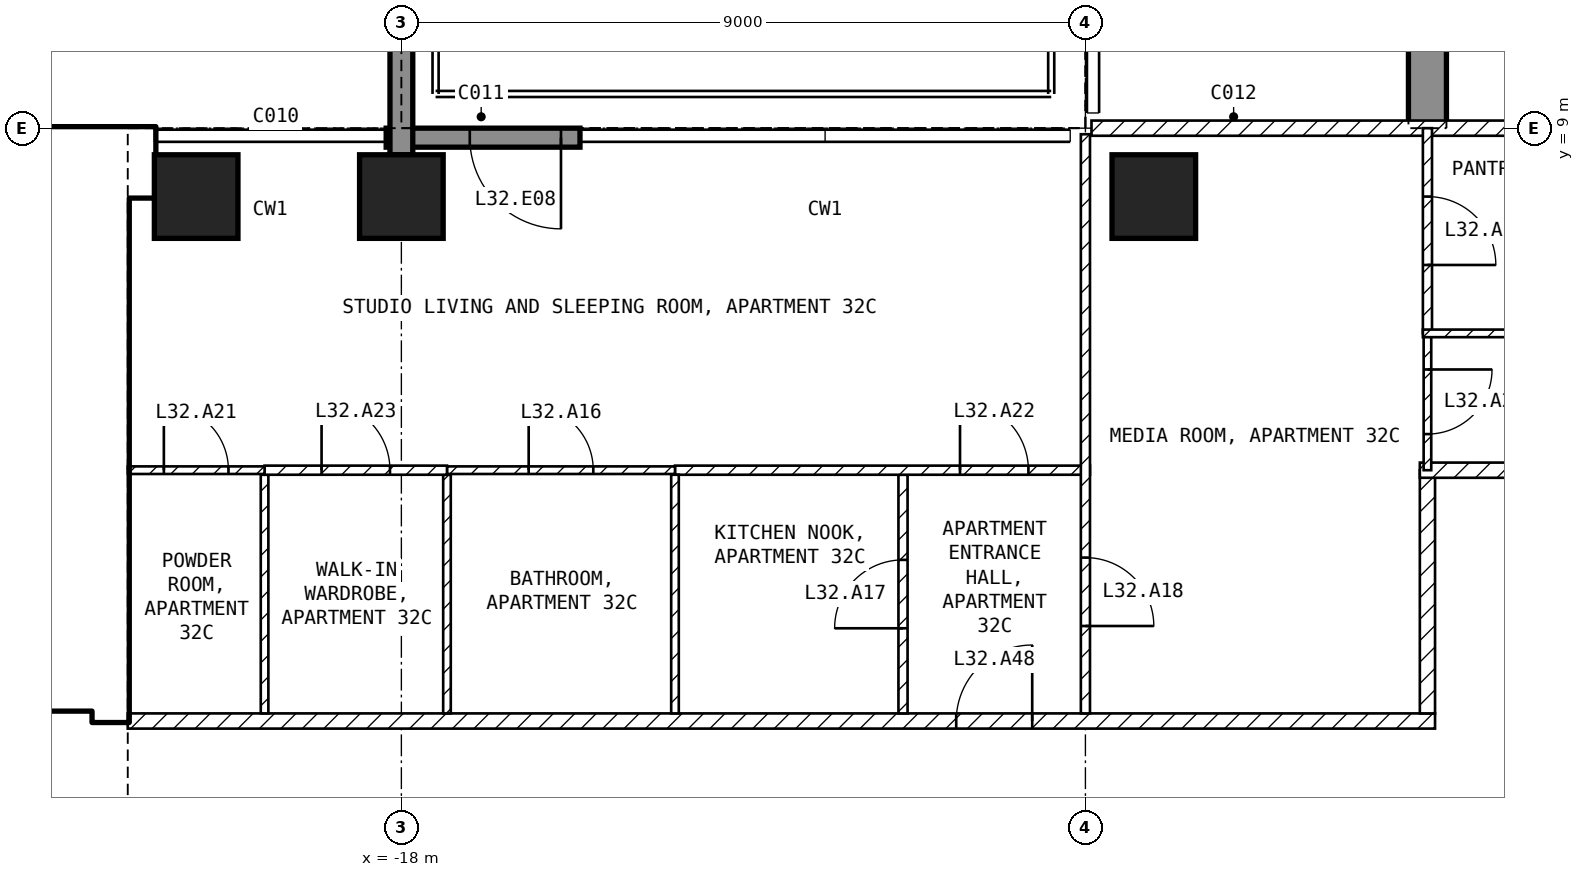
"""IFC4 building model, lengths in metres.
Left out: names, types, materials, properties, quantities, classifications, styles, units other than length and angle.
Written with IfcOpenShell. Run it as: python <this file> out.ifc"""

import sys

from ifc_helpers import new_model, si_unit, direction, frame, frame_2d, origin, origin_2d, place, context, subcontext, project, spatial, polyline, rectangle, outline, extrude, element, fill, save


model = new_model("IFC4")
c1 = context("Model", 3, precision=1e-05, world=origin(), true_north=direction((0.0, 1.0)))
c2 = subcontext(c1, "Body", "Model", "MODEL_VIEW")
j1 = project(units=[si_unit("LENGTHUNIT", "METRE"), si_unit("PLANEANGLEUNIT", "RADIAN")], contexts=[c1])
p1 = place(None, origin())
s1 = spatial("IfcSite", under=j1, at=p1, CompositionType="ELEMENT")
p2 = place(p1, origin())
s2 = spatial("IfcBuilding", under=s1, at=p2, CompositionType="ELEMENT")
p3 = place(p2, frame((0.0, 0.0, 133.9)))
s3 = spatial("IfcBuildingStorey", under=s2, at=p3, CompositionType="ELEMENT", Elevation=133.9)
for number, where, z_axis, x_axis in (
    (1, (-20.7, 8.1, -0.25), (0.0, 0.0, 1.0), (1.0, 0.0, 0.0)),
    (2, (-18.0, 8.1, -0.25), (0.0, 0.0, 1.0), (1.0, 0.0, 0.0)),
    (3, (-8.1, 8.1, -0.25), (0.0, 0.0, 1.0), (1.0, 0.0, 0.0)),
):
    element("IfcColumn", number, at=place(p3, frame(where, z_axis=z_axis, x_axis=x_axis)), inside=s3, PredefinedType="COLUMN", context=c2, shape_type="SweptSolid", body=[
        extrude(rectangle(XDim=1.1, YDim=1.1, at=origin_2d()), origin(), (0.0, 0.0, 1.0), 3.5),
    ])
p4 = place(p3, frame((-4.75, 9.0, -0.25), z_axis=(1.0, 0.0, 0.0), x_axis=(0.0, 1.0, 0.0)))
e4 = element("IfcWall", 4, at=p4, inside=s3, PredefinedType="SHEAR", context=c2, shape_type="SweptSolid", body=[
    extrude(outline(polyline([(0.0, 0.0), (2.1, 0.0), (2.1, 2.65), (4.5, 2.65), (4.5, 0.0), (9.9, 0.0), (9.9, 2.65), (12.3, 2.65), (12.3, 0.0), (16.55, 0.0), (16.55, 3.5), (0.0, 3.5), (0.0, 0.0)])), origin(), (0.0, 0.0, 1.0), 0.5),
])
p5 = place(p3, frame((-15.65, 8.875, 0.0), z_axis=(0.0, 0.0, 1.0), x_axis=(-1.0, 0.0, 0.0)))
e5 = element("IfcWall", 5, at=p5, inside=s3, PredefinedType="SOLIDWALL", context=c2, shape_type="SweptSolid", body=[
    extrude(rectangle(XDim=2.55, YDim=0.25, at=frame_2d((1.275, 0.0))), origin(), (0.0, 0.0, 1.0), 3.25),
])
p6 = place(p5, frame((0.25, 0.0, 0.0)))
e6 = element("IfcOpeningElement", 6, at=p6, cuts=e5, PredefinedType="OPENING", context=c2, shape_type="SweptSolid", body=[
    extrude(rectangle(XDim=1.2, YDim=2.4, at=frame_2d((0.6, 1.2))), frame((0.0, 0.135, 0.0), z_axis=(0.0, -1.0, 0.0), x_axis=(1.0, 0.0, 0.0)), (0.0, 0.0, 1.0), 0.27),
])
p7 = place(p3, frame((-18.0, 8.65, 0.0), z_axis=(0.0, 0.0, 1.0), x_axis=(0.0, 1.0, 0.0)))
e7 = element("IfcWall", 7, at=p7, inside=s3, PredefinedType="SOLIDWALL", context=c2, shape_type="SweptSolid", body=[
    extrude(rectangle(XDim=3.09, YDim=0.3, at=frame_2d((1.545, 0.0))), origin(), (0.0, 0.0, 1.0), 3.25),
])
p8 = place(p3, frame((-29.45, 8.55, 0.0), z_axis=(0.0, 0.0, 1.0), x_axis=(1.0, 0.0, 0.0)))
e8 = element("IfcWall", 8, at=p8, inside=s3, PredefinedType="SHEAR", context=c2, shape_type="SweptSolid", body=[
    extrude(rectangle(XDim=8.2, YDim=0.9, at=frame_2d((4.1, 0.0))), origin(), (0.0, 0.0, 1.0), 3.25),
])
p9 = place(p3, frame((-21.825, 1.2, 0.0), z_axis=(0.0, 0.0, 1.0), x_axis=(0.0, 1.0, 0.0)))
e9 = element("IfcWall", 9, at=p9, inside=s3, PredefinedType="SHEAR", context=c2, shape_type="SweptSolid", body=[
    extrude(rectangle(XDim=6.9, YDim=0.45, at=frame_2d((3.45, 0.0))), origin(), (0.0, 0.0, 1.0), 3.25),
])
p10 = place(p3, frame((-33.05, 1.45, 0.0), z_axis=(0.0, 0.0, 1.0), x_axis=(1.0, 0.0, 0.0)))
e10 = element("IfcWall", 10, at=p10, inside=s3, PredefinedType="SOLIDWALL", context=c2, shape_type="SweptSolid", body=[
    extrude(rectangle(XDim=11.0, YDim=0.2, at=frame_2d((5.5, 0.0))), origin(), (0.0, 0.0, 1.0), 3.25),
])
p11 = place(p10, frame((9.25, 0.0, 0.0)))
e11 = element("IfcOpeningElement", 11, at=p11, cuts=e10, PredefinedType="OPENING", context=c2, shape_type="SweptSolid", body=[
    extrude(rectangle(XDim=1.0, YDim=2.1, at=frame_2d((0.5, 1.05))), frame((0.0, 0.11, 0.0), z_axis=(0.0, -1.0, 0.0), x_axis=(1.0, 0.0, 0.0)), (0.0, 0.0, 1.0), 0.22),
])
p12 = place(p10, frame((6.75, 0.0, 0.0)))
e12 = element("IfcOpeningElement", 12, at=p12, cuts=e10, PredefinedType="OPENING", context=c2, shape_type="SweptSolid", body=[
    extrude(rectangle(XDim=1.0, YDim=2.1, at=frame_2d((0.5, 1.05))), frame((0.0, 0.11, 0.0), z_axis=(0.0, -1.0, 0.0), x_axis=(1.0, 0.0, 0.0)), (0.0, 0.0, 1.0), 0.22),
])
p13 = place(p10, frame((1.025, 0.0, 0.0)))
e13 = element("IfcOpeningElement", 13, at=p13, cuts=e10, PredefinedType="OPENING", context=c2, shape_type="SweptSolid", body=[
    extrude(rectangle(XDim=0.9, YDim=2.1, at=frame_2d((0.45, 1.05))), frame((0.0, 0.11, 0.0), z_axis=(0.0, -1.0, 0.0), x_axis=(1.0, 0.0, 0.0)), (0.0, 0.0, 1.0), 0.22),
])
p14 = place(p3, frame((-28.35, 5.15, 0.0), z_axis=(0.0, 0.0, 1.0), x_axis=(1.0, 0.0, 0.0)))
e14 = element("IfcWall", 14, at=p14, inside=s3, PredefinedType="SOLIDWALL", context=c2, shape_type="SweptSolid", body=[
    extrude(rectangle(XDim=6.3, YDim=0.2, at=frame_2d((3.15, 0.0))), origin(), (0.0, 0.0, 1.0), 3.25),
])
p15 = place(p14, frame((5.1, 0.0, 0.0)))
e15 = element("IfcOpeningElement", 15, at=p15, cuts=e14, PredefinedType="OPENING", context=c2, shape_type="SweptSolid", body=[
    extrude(rectangle(XDim=1.0, YDim=2.1, at=frame_2d((0.5, 1.05))), frame((0.0, 0.11, 0.0), z_axis=(0.0, -1.0, 0.0), x_axis=(1.0, 0.0, 0.0)), (0.0, 0.0, 1.0), 0.22),
])
p16 = place(p3, frame((-21.6, 1.2, 0.0), z_axis=(0.0, 0.0, 1.0), x_axis=(1.0, 0.0, 0.0)))
e16 = element("IfcWall", 16, at=p16, inside=s3, PredefinedType="PARTITIONING", context=c2, shape_type="SweptSolid", body=[
    extrude(rectangle(XDim=17.2, YDim=0.2, at=frame_2d((8.6, 0.0))), origin(), (0.0, 0.0, 1.0), 3.25),
])
p17 = place(p16, frame((10.9, 0.0, 0.0)))
e17 = element("IfcOpeningElement", 17, at=p17, cuts=e16, PredefinedType="OPENING", context=c2, shape_type="SweptSolid", body=[
    extrude(rectangle(XDim=1.0, YDim=2.1, at=frame_2d((0.5, 1.05))), frame((0.0, 0.11, 0.0), z_axis=(0.0, -1.0, 0.0), x_axis=(1.0, 0.0, 0.0)), (0.0, 0.0, 1.0), 0.22),
])
p18 = place(p3, frame((-4.5, 1.3, 0.0), z_axis=(0.0, 0.0, 1.0), x_axis=(0.0, 1.0, 0.0)))
e18 = element("IfcWall", 18, at=p18, inside=s3, PredefinedType="PARTITIONING", context=c2, shape_type="SweptSolid", body=[
    extrude(rectangle(XDim=3.2, YDim=0.2, at=frame_2d((1.6, 0.0))), origin(), (0.0, 0.0, 1.0), 3.25),
])
p19 = place(p3, frame((-4.6, 4.5, 0.0), z_axis=(0.0, 0.0, 1.0), x_axis=(1.0, 0.0, 0.0)))
e19 = element("IfcWall", 19, at=p19, inside=s3, PredefinedType="PARTITIONING", context=c2, shape_type="SweptSolid", body=[
    extrude(rectangle(XDim=3.5, YDim=0.2, at=frame_2d((1.75, 0.0))), origin(), (0.0, 0.0, 1.0), 3.25),
])
p20 = place(p3, frame((-8.92, 9.0, 0.0), z_axis=(0.0, 0.0, 1.0), x_axis=(1.0, 0.0, 0.0)))
e20 = element("IfcWall", 20, at=p20, inside=s3, PredefinedType="PARTITIONING", context=c2, shape_type="SweptSolid", body=[
    extrude(rectangle(XDim=17.84, YDim=0.2, at=frame_2d((8.92, 0.0))), origin(), (0.0, 0.0, 1.0), 3.25),
])
p21 = place(p20, frame((8.42, 0.0, 0.0)))
e21 = element("IfcOpeningElement", 21, at=p21, cuts=e20, PredefinedType="OPENING", context=c2, shape_type="SweptSolid", body=[
    extrude(rectangle(XDim=1.0, YDim=2.1, at=frame_2d((0.5, 1.05))), frame((0.0, 0.11, 0.0), z_axis=(0.0, -1.0, 0.0), x_axis=(1.0, 0.0, 0.0)), (0.0, 0.0, 1.0), 0.22),
])
p22 = place(p3, frame((-11.4, 1.3, 0.0), z_axis=(0.0, 0.0, 1.0), x_axis=(0.0, 1.0, 0.0)))
e22 = element("IfcWall", 22, at=p22, inside=s3, PredefinedType="PARTITIONING", context=c2, shape_type="SweptSolid", body=[
    extrude(rectangle(XDim=3.14, YDim=0.12, at=frame_2d((1.57, 0.0))), origin(), (0.0, 0.0, 1.0), 3.25),
])
p23 = place(p22, frame((1.12, 0.0, 0.0)))
e23 = element("IfcOpeningElement", 23, at=p23, cuts=e22, PredefinedType="OPENING", context=c2, shape_type="SweptSolid", body=[
    extrude(rectangle(XDim=0.9, YDim=2.1, at=frame_2d((0.45, 1.05))), frame((0.0, 0.07, 0.0), z_axis=(0.0, -1.0, 0.0), x_axis=(1.0, 0.0, 0.0)), (0.0, 0.0, 1.0), 0.14),
])
p24 = place(p3, frame((-14.4, 4.5, 0.0), z_axis=(0.0, 0.0, 1.0), x_axis=(1.0, 0.0, 0.0)))
e24 = element("IfcWall", 24, at=p24, inside=s3, PredefinedType="PARTITIONING", context=c2, shape_type="SweptSolid", body=[
    extrude(rectangle(XDim=5.46, YDim=0.12, at=frame_2d((2.73, 0.0))), origin(), (0.0, 0.0, 1.0), 3.25),
])
p25 = place(p24, frame((3.75, 0.0, 0.0)))
e25 = element("IfcOpeningElement", 25, at=p25, cuts=e24, PredefinedType="OPENING", context=c2, shape_type="SweptSolid", body=[
    extrude(rectangle(XDim=0.9, YDim=2.1, at=frame_2d((0.45, 1.05))), frame((0.0, 0.07, 0.0), z_axis=(0.0, -1.0, 0.0), x_axis=(1.0, 0.0, 0.0)), (0.0, 0.0, 1.0), 0.14),
])
p26 = place(p3, frame((-9.0, 8.92, 0.0), z_axis=(0.0, 0.0, 1.0), x_axis=(0.0, -1.0, 0.0)))
e26 = element("IfcWall", 26, at=p26, inside=s3, PredefinedType="PARTITIONING", context=c2, shape_type="SweptSolid", body=[
    extrude(rectangle(XDim=7.62, YDim=0.12, at=frame_2d((3.81, 0.0))), origin(), (0.0, 0.0, 1.0), 3.25),
])
p27 = place(p26, frame((5.57, 0.0, 0.0)))
e27 = element("IfcOpeningElement", 27, at=p27, cuts=e26, PredefinedType="OPENING", context=c2, shape_type="SweptSolid", body=[
    extrude(rectangle(XDim=0.9, YDim=2.1, at=frame_2d((0.45, 1.05))), frame((0.0, 0.07, 0.0), z_axis=(0.0, -1.0, 0.0), x_axis=(1.0, 0.0, 0.0)), (0.0, 0.0, 1.0), 0.14),
])
for number, where, z_axis, x_axis in (
    (28, (-14.4, 1.3, 0.0), (0.0, 0.0, 1.0), (0.0, 1.0, 0.0)),
    (29, (-17.4, 1.3, 0.0), (0.0, 0.0, 1.0), (0.0, 1.0, 0.0)),
):
    element("IfcWall", number, at=place(p3, frame(where, z_axis=z_axis, x_axis=x_axis)), inside=s3, PredefinedType="PARTITIONING", context=c2, shape_type="SweptSolid", body=[
        extrude(rectangle(XDim=3.14, YDim=0.1, at=frame_2d((1.57, 0.0))), origin(), (0.0, 0.0, 1.0), 3.25),
    ])
p28 = place(p3, frame((-17.4, 4.5, 0.0), z_axis=(0.0, 0.0, 1.0), x_axis=(1.0, 0.0, 0.0)))
e30 = element("IfcWall", 30, at=p28, inside=s3, PredefinedType="PARTITIONING", context=c2, shape_type="SweptSolid", body=[
    extrude(rectangle(XDim=3.0, YDim=0.1, at=frame_2d((1.5, 0.0))), origin(), (0.0, 0.0, 1.0), 3.25),
])
p29 = place(p28, frame((1.075, 0.0, 0.0)))
e31 = element("IfcOpeningElement", 31, at=p29, cuts=e30, PredefinedType="OPENING", context=c2, shape_type="SweptSolid", body=[
    extrude(rectangle(XDim=0.85, YDim=2.1, at=frame_2d((0.425, 1.05))), frame((0.0, 0.06, 0.0), z_axis=(0.0, -1.0, 0.0), x_axis=(1.0, 0.0, 0.0)), (0.0, 0.0, 1.0), 0.12),
])
p30 = place(p3, frame((-19.8, 1.3, 0.0), z_axis=(0.0, 0.0, 1.0), x_axis=(0.0, 1.0, 0.0)))
e32 = element("IfcWall", 32, at=p30, inside=s3, PredefinedType="PARTITIONING", context=c2, shape_type="SweptSolid", body=[
    extrude(rectangle(XDim=3.14, YDim=0.1, at=frame_2d((1.57, 0.0))), origin(), (0.0, 0.0, 1.0), 3.25),
])
p31 = place(p3, frame((-19.8, 4.5, 0.0), z_axis=(0.0, 0.0, 1.0), x_axis=(1.0, 0.0, 0.0)))
e33 = element("IfcWall", 33, at=p31, inside=s3, PredefinedType="PARTITIONING", context=c2, shape_type="SweptSolid", body=[
    extrude(rectangle(XDim=2.4, YDim=0.12, at=frame_2d((1.2, 0.0))), origin(), (0.0, 0.0, 1.0), 3.25),
])
p32 = place(p31, frame((0.75, 0.0, 0.0)))
e34 = element("IfcOpeningElement", 34, at=p32, cuts=e33, PredefinedType="OPENING", context=c2, shape_type="SweptSolid", body=[
    extrude(rectangle(XDim=0.9, YDim=2.1, at=frame_2d((0.45, 1.05))), frame((0.0, 0.07, 0.0), z_axis=(0.0, -1.0, 0.0), x_axis=(1.0, 0.0, 0.0)), (0.0, 0.0, 1.0), 0.14),
])
p33 = place(p3, frame((-21.6, 4.5, 0.0), z_axis=(0.0, 0.0, 1.0), x_axis=(1.0, 0.0, 0.0)))
e35 = element("IfcWall", 35, at=p33, inside=s3, PredefinedType="PARTITIONING", context=c2, shape_type="SweptSolid", body=[
    extrude(rectangle(XDim=1.8, YDim=0.1, at=frame_2d((0.9, 0.0))), origin(), (0.0, 0.0, 1.0), 3.25),
])
p34 = place(p33, frame((0.475, 0.0, 0.0)))
e36 = element("IfcOpeningElement", 36, at=p34, cuts=e35, PredefinedType="OPENING", context=c2, shape_type="SweptSolid", body=[
    extrude(rectangle(XDim=0.85, YDim=2.1, at=frame_2d((0.425, 1.05))), frame((0.0, 0.06, 0.0), z_axis=(0.0, -1.0, 0.0), x_axis=(1.0, 0.0, 0.0)), (0.0, 0.0, 1.0), 0.12),
])
p35 = place(p3, frame((-4.5, 6.3, 0.0), z_axis=(0.0, 0.0, 1.0), x_axis=(0.0, -1.0, 0.0)))
e37 = element("IfcWall", 37, at=p35, inside=s3, PredefinedType="PARTITIONING", context=c2, shape_type="SweptSolid", body=[
    extrude(rectangle(XDim=1.8, YDim=0.1, at=frame_2d((0.9, 0.0))), origin(), (0.0, 0.0, 1.0), 3.25),
])
p36 = place(p35, frame((0.475, 0.0, 0.0)))
e38 = element("IfcOpeningElement", 38, at=p36, cuts=e37, PredefinedType="OPENING", context=c2, shape_type="SweptSolid", body=[
    extrude(rectangle(XDim=0.85, YDim=2.1, at=frame_2d((0.425, 1.05))), frame((0.0, 0.06, 0.0), z_axis=(0.0, -1.0, 0.0), x_axis=(1.0, 0.0, 0.0)), (0.0, 0.0, 1.0), 0.12),
])
p37 = place(p3, frame((-4.5, 9.0, 0.0), z_axis=(0.0, 0.0, 1.0), x_axis=(0.0, -1.0, 0.0)))
e39 = element("IfcWall", 39, at=p37, inside=s3, PredefinedType="PARTITIONING", context=c2, shape_type="SweptSolid", body=[
    extrude(rectangle(XDim=2.7, YDim=0.12, at=frame_2d((1.35, 0.0))), origin(), (0.0, 0.0, 1.0), 3.25),
])
p38 = place(p37, frame((0.9, 0.0, 0.0)))
e40 = element("IfcOpeningElement", 40, at=p38, cuts=e39, PredefinedType="OPENING", context=c2, shape_type="SweptSolid", body=[
    extrude(rectangle(XDim=0.9, YDim=2.1, at=frame_2d((0.45, 1.05))), frame((0.0, 0.07, 0.0), z_axis=(0.0, -1.0, 0.0), x_axis=(1.0, 0.0, 0.0)), (0.0, 0.0, 1.0), 0.14),
])
p39 = place(p3, frame((-4.56, 6.3, 0.0), z_axis=(0.0, 0.0, 1.0), x_axis=(1.0, 0.0, 0.0)))
e41 = element("IfcWall", 41, at=p39, inside=s3, PredefinedType="PARTITIONING", context=c2, shape_type="SweptSolid", body=[
    extrude(rectangle(XDim=3.46, YDim=0.1, at=frame_2d((1.73, 0.0))), origin(), (0.0, 0.0, 1.0), 3.25),
])
p40 = place(p6, origin())
e42 = element("IfcDoor", 42, at=p40, inside=s3, OperationType="SINGLE_SWING_LEFT", PredefinedType="DOOR", context=c2, shape_type="SweptSolid", body=[
    extrude(rectangle(XDim=1.2, YDim=2.4, at=frame_2d((0.6, 1.2))), frame((0.0, 0.025, 0.0), z_axis=(0.0, -1.0, 0.0), x_axis=(1.0, 0.0, 0.0)), (0.0, 0.0, 1.0), 0.05),
])
fill(e6, e42)
p41 = place(p15, origin())
e43 = element("IfcDoor", 43, at=p41, inside=s3, OperationType="SINGLE_SWING_LEFT", PredefinedType="DOOR", context=c2, shape_type="SweptSolid", body=[
    extrude(rectangle(XDim=1.0, YDim=2.1, at=frame_2d((0.5, 1.05))), frame((0.0, 0.025, 0.0), z_axis=(0.0, -1.0, 0.0), x_axis=(1.0, 0.0, 0.0)), (0.0, 0.0, 1.0), 0.05),
])
fill(e15, e43)
p42 = place(p29, origin())
e44 = element("IfcDoor", 44, at=p42, inside=s3, OperationType="SINGLE_SWING_LEFT", PredefinedType="DOOR", context=c2, shape_type="SweptSolid", body=[
    extrude(rectangle(XDim=0.85, YDim=2.1, at=frame_2d((0.425, 1.05))), frame((0.0, 0.025, 0.0), z_axis=(0.0, -1.0, 0.0), x_axis=(1.0, 0.0, 0.0)), (0.0, 0.0, 1.0), 0.05),
])
fill(e31, e44)
p43 = place(p23, origin())
e45 = element("IfcDoor", 45, at=p43, inside=s3, OperationType="SINGLE_SWING_LEFT", PredefinedType="DOOR", context=c2, shape_type="SweptSolid", body=[
    extrude(rectangle(XDim=0.9, YDim=2.1, at=frame_2d((0.45, 1.05))), frame((0.0, 0.025, 0.0), z_axis=(0.0, -1.0, 0.0), x_axis=(1.0, 0.0, 0.0)), (0.0, 0.0, 1.0), 0.05),
])
fill(e23, e45)
p44 = place(p27, origin())
e46 = element("IfcDoor", 46, at=p44, inside=s3, OperationType="SINGLE_SWING_RIGHT", PredefinedType="DOOR", context=c2, shape_type="SweptSolid", body=[
    extrude(rectangle(XDim=0.9, YDim=2.1, at=frame_2d((0.45, 1.05))), frame((0.0, 0.025, 0.0), z_axis=(0.0, -1.0, 0.0), x_axis=(1.0, 0.0, 0.0)), (0.0, 0.0, 1.0), 0.05),
])
fill(e27, e46)
p45 = place(p38, origin())
e47 = element("IfcDoor", 47, at=p45, inside=s3, OperationType="SINGLE_SWING_RIGHT", PredefinedType="DOOR", context=c2, shape_type="SweptSolid", body=[
    extrude(rectangle(XDim=0.9, YDim=2.1, at=frame_2d((0.45, 1.05))), frame((0.0, 0.025, 0.0), z_axis=(0.0, -1.0, 0.0), x_axis=(1.0, 0.0, 0.0)), (0.0, 0.0, 1.0), 0.05),
])
fill(e40, e47)
p46 = place(p36, origin())
e48 = element("IfcDoor", 48, at=p46, inside=s3, OperationType="SINGLE_SWING_LEFT", PredefinedType="DOOR", context=c2, shape_type="SweptSolid", body=[
    extrude(rectangle(XDim=0.85, YDim=2.1, at=frame_2d((0.425, 1.05))), frame((0.0, 0.025, 0.0), z_axis=(0.0, -1.0, 0.0), x_axis=(1.0, 0.0, 0.0)), (0.0, 0.0, 1.0), 0.05),
])
fill(e38, e48)
p47 = place(p34, origin())
e49 = element("IfcDoor", 49, at=p47, inside=s3, OperationType="SINGLE_SWING_LEFT", PredefinedType="DOOR", context=c2, shape_type="SweptSolid", body=[
    extrude(rectangle(XDim=0.85, YDim=2.1, at=frame_2d((0.425, 1.05))), frame((0.0, 0.025, 0.0), z_axis=(0.0, -1.0, 0.0), x_axis=(1.0, 0.0, 0.0)), (0.0, 0.0, 1.0), 0.05),
])
fill(e36, e49)
p48 = place(p25, origin())
e50 = element("IfcDoor", 50, at=p48, inside=s3, OperationType="SINGLE_SWING_LEFT", PredefinedType="DOOR", context=c2, shape_type="SweptSolid", body=[
    extrude(rectangle(XDim=0.9, YDim=2.1, at=frame_2d((0.45, 1.05))), frame((0.0, 0.025, 0.0), z_axis=(0.0, -1.0, 0.0), x_axis=(1.0, 0.0, 0.0)), (0.0, 0.0, 1.0), 0.05),
])
fill(e25, e50)
p49 = place(p32, origin())
e51 = element("IfcDoor", 51, at=p49, inside=s3, OperationType="SINGLE_SWING_LEFT", PredefinedType="DOOR", context=c2, shape_type="SweptSolid", body=[
    extrude(rectangle(XDim=0.9, YDim=2.1, at=frame_2d((0.45, 1.05))), frame((0.0, 0.025, 0.0), z_axis=(0.0, -1.0, 0.0), x_axis=(1.0, 0.0, 0.0)), (0.0, 0.0, 1.0), 0.05),
])
fill(e34, e51)
p50 = place(p17, origin())
e52 = element("IfcDoor", 52, at=p50, inside=s3, OperationType="SINGLE_SWING_RIGHT", PredefinedType="DOOR", context=c2, shape_type="SweptSolid", body=[
    extrude(rectangle(XDim=1.0, YDim=2.1, at=frame_2d((0.5, 1.05))), frame((0.0, 0.025, 0.0), z_axis=(0.0, -1.0, 0.0), x_axis=(1.0, 0.0, 0.0)), (0.0, 0.0, 1.0), 0.05),
])
fill(e17, e52)
save(model, sys.argv[1])
